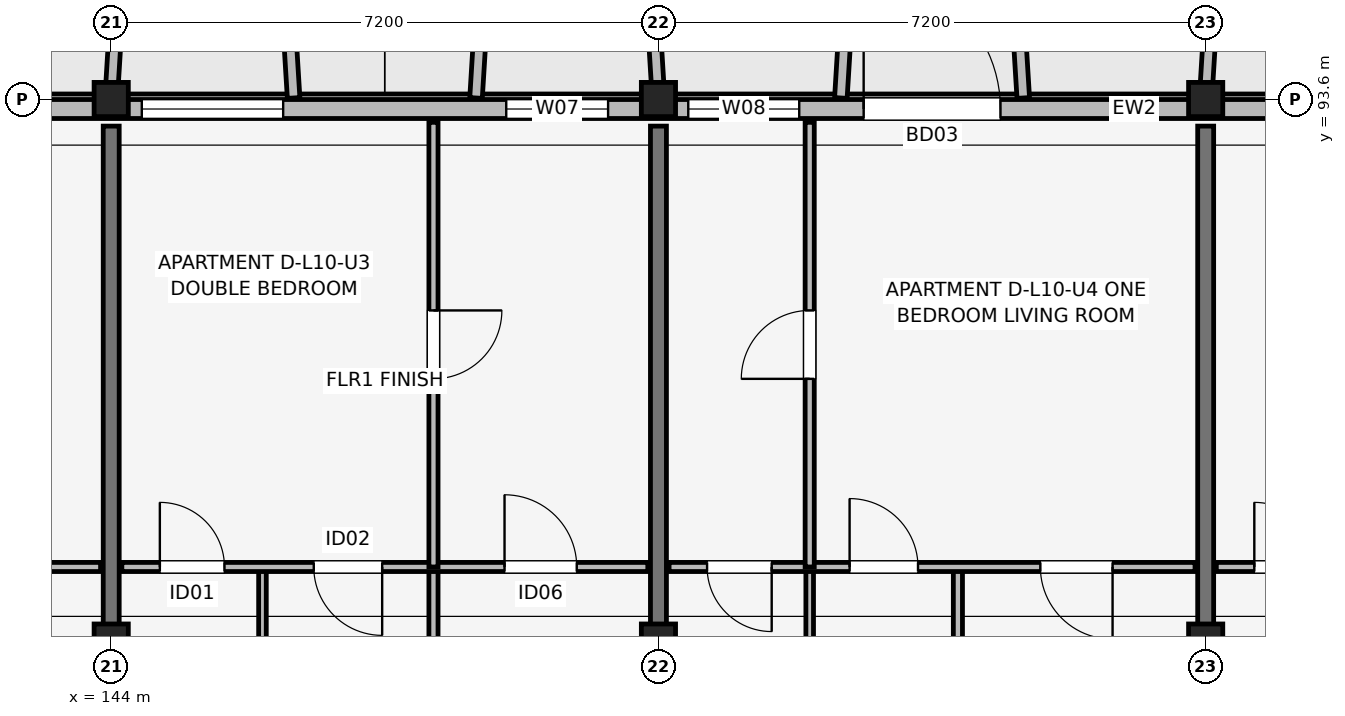
"""IFC4 building model, lengths in metres.
Left out: names, types, materials, properties, quantities, classifications, styles, units other than length and angle.
Written with IfcOpenShell. Run it as: python <this file> out.ifc"""

import sys

from ifc_helpers import new_model, si_unit, direction, frame, frame_2d, origin, origin_2d, place, context, subcontext, project, spatial, rectangle, extrude, element, fill, save


model = new_model("IFC4")
c1 = context("Model", 3, precision=1e-05, world=origin(), true_north=direction((0.0, 1.0)))
c2 = subcontext(c1, "Body", "Model", "MODEL_VIEW")
j1 = project(units=[si_unit("LENGTHUNIT", "METRE"), si_unit("PLANEANGLEUNIT", "RADIAN")], contexts=[c1])
p1 = place(None, origin())
s1 = spatial("IfcSite", under=j1, at=p1, CompositionType="ELEMENT")
p2 = place(p1, origin())
s2 = spatial("IfcBuilding", under=s1, at=p2, CompositionType="ELEMENT")
p3 = place(p2, frame((0.0, 0.0, 33.9)))
s3 = spatial("IfcBuildingStorey", under=s2, at=p3, CompositionType="ELEMENT", Elevation=33.9)
p4 = place(p3, frame((144.0, 86.4, 0.0), z_axis=(0.0, 0.0, 1.0), x_axis=(1.0, 0.0, 0.0)))
e1 = element("IfcColumn", 1, at=p4, inside=s3, PredefinedType="COLUMN", context=c2, shape_type="SweptSolid", body=[
    extrude(rectangle(XDim=0.45, YDim=0.6, at=origin_2d()), origin(), (0.0, 0.0, 1.0), 3.15),
])
p5 = place(p3, frame((144.0, 93.6, 0.0), z_axis=(0.0, 0.0, 1.0), x_axis=(1.0, 0.0, 0.0)))
e2 = element("IfcColumn", 2, at=p5, inside=s3, PredefinedType="COLUMN", context=c2, shape_type="SweptSolid", body=[
    extrude(rectangle(XDim=0.45, YDim=0.45, at=origin_2d()), origin(), (0.0, 0.0, 1.0), 3.15),
])
p6 = place(p3, frame((151.2, 86.4, 0.0), z_axis=(0.0, 0.0, 1.0), x_axis=(1.0, 0.0, 0.0)))
e3 = element("IfcColumn", 3, at=p6, inside=s3, PredefinedType="COLUMN", context=c2, shape_type="SweptSolid", body=[
    extrude(rectangle(XDim=0.45, YDim=0.6, at=origin_2d()), origin(), (0.0, 0.0, 1.0), 3.15),
])
p7 = place(p3, frame((151.2, 93.6, 0.0), z_axis=(0.0, 0.0, 1.0), x_axis=(1.0, 0.0, 0.0)))
e4 = element("IfcColumn", 4, at=p7, inside=s3, PredefinedType="COLUMN", context=c2, shape_type="SweptSolid", body=[
    extrude(rectangle(XDim=0.45, YDim=0.45, at=origin_2d()), origin(), (0.0, 0.0, 1.0), 3.15),
])
p8 = place(p3, frame((158.4, 86.4, 0.0), z_axis=(0.0, 0.0, 1.0), x_axis=(1.0, 0.0, 0.0)))
e5 = element("IfcColumn", 5, at=p8, inside=s3, PredefinedType="COLUMN", context=c2, shape_type="SweptSolid", body=[
    extrude(rectangle(XDim=0.45, YDim=0.6, at=origin_2d()), origin(), (0.0, 0.0, 1.0), 3.15),
])
p9 = place(p3, frame((158.4, 93.6, 0.0), z_axis=(0.0, 0.0, 1.0), x_axis=(1.0, 0.0, 0.0)))
e6 = element("IfcColumn", 6, at=p9, inside=s3, PredefinedType="COLUMN", context=c2, shape_type="SweptSolid", body=[
    extrude(rectangle(XDim=0.45, YDim=0.45, at=origin_2d()), origin(), (0.0, 0.0, 1.0), 3.15),
])
for number, where, z_axis, x_axis in (
    (7, (144.0, 83.85, 0.0), (0.0, 0.0, 1.0), (0.0, 1.0, 0.0)),
    (8, (151.2, 83.85, 0.0), (0.0, 0.0, 1.0), (0.0, 1.0, 0.0)),
    (9, (158.4, 83.85, 0.0), (0.0, 0.0, 1.0), (0.0, 1.0, 0.0)),
):
    element("IfcWall", number, at=place(p3, frame(where, z_axis=z_axis, x_axis=x_axis)), inside=s3, PredefinedType="SHEAR", context=c2, shape_type="SweptSolid", body=[
        extrude(rectangle(XDim=9.4, YDim=0.21, at=frame_2d((4.7, 0.0))), origin(), (0.0, 0.0, 1.0), 3.15),
    ])
p10 = place(p3, frame((162.8, 93.475, 0.0), z_axis=(0.0, 0.0, 1.0), x_axis=(-1.0, 0.0, 0.0)))
e10 = element("IfcWall", 10, at=p10, inside=s3, PredefinedType="SOLIDWALL", context=c2, shape_type="SweptSolid", body=[
    extrude(rectangle(XDim=30.4, YDim=0.25, at=frame_2d((15.2, 0.0))), origin(), (0.0, 0.0, 1.0), 2.45),
])
p11 = place(p10, frame((23.15, 0.0, 0.0), z_axis=(0.0, 0.0, 1.0), x_axis=(-1.0, 0.0, 0.0)))
e11 = element("IfcOpeningElement", 11, at=p11, cuts=e10, PredefinedType="OPENING", context=c2, shape_type="SweptSolid", body=[
    extrude(rectangle(XDim=1.5, YDim=2.15, at=frame_2d((0.75, 1.075))), frame((0.0, 0.135, 0.0), z_axis=(0.0, -1.0, 0.0), x_axis=(1.0, 0.0, 0.0)), (0.0, 0.0, 1.0), 0.27),
])
p12 = place(p10, frame((8.9, 0.0, 0.0), z_axis=(0.0, 0.0, 1.0), x_axis=(-1.0, 0.0, 0.0)))
e12 = element("IfcOpeningElement", 12, at=p12, cuts=e10, PredefinedType="OPENING", context=c2, shape_type="SweptSolid", body=[
    extrude(rectangle(XDim=1.8, YDim=2.15, at=frame_2d((0.9, 1.075))), frame((0.0, 0.135, 0.0), z_axis=(0.0, -1.0, 0.0), x_axis=(1.0, 0.0, 0.0)), (0.0, 0.0, 1.0), 0.27),
])
p13 = place(p10, frame((26.403, 0.0, 0.7)))
e13 = element("IfcOpeningElement", 13, at=p13, cuts=e10, PredefinedType="OPENING", context=c2, shape_type="SweptSolid", body=[
    extrude(rectangle(XDim=1.86, YDim=1.6, at=frame_2d((0.93, 0.8))), frame((0.0, 0.135, 0.0), z_axis=(0.0, -1.0, 0.0), x_axis=(1.0, 0.0, 0.0)), (0.0, 0.0, 1.0), 0.27),
])
p14 = place(p10, frame((16.538, 0.0, 0.7)))
e14 = element("IfcOpeningElement", 14, at=p14, cuts=e10, PredefinedType="OPENING", context=c2, shape_type="SweptSolid", body=[
    extrude(rectangle(XDim=1.86, YDim=1.6, at=frame_2d((0.93, 0.8))), frame((0.0, 0.135, 0.0), z_axis=(0.0, -1.0, 0.0), x_axis=(1.0, 0.0, 0.0)), (0.0, 0.0, 1.0), 0.27),
])
p15 = place(p10, frame((12.262, 0.0, 0.75)))
e15 = element("IfcOpeningElement", 15, at=p15, cuts=e10, PredefinedType="OPENING", context=c2, shape_type="SweptSolid", body=[
    extrude(rectangle(XDim=1.34, YDim=1.55, at=frame_2d((0.67, 0.775))), frame((0.0, 0.135, 0.0), z_axis=(0.0, -1.0, 0.0), x_axis=(1.0, 0.0, 0.0)), (0.0, 0.0, 1.0), 0.27),
])
p16 = place(p10, frame((9.748, 0.0, 0.75)))
e16 = element("IfcOpeningElement", 16, at=p16, cuts=e10, PredefinedType="OPENING", context=c2, shape_type="SweptSolid", body=[
    extrude(rectangle(XDim=1.46, YDim=1.55, at=frame_2d((0.73, 0.775))), frame((0.0, 0.135, 0.0), z_axis=(0.0, -1.0, 0.0), x_axis=(1.0, 0.0, 0.0)), (0.0, 0.0, 1.0), 0.27),
])
p17 = place(p10, frame((2.978, 0.0, 0.75)))
e17 = element("IfcOpeningElement", 17, at=p17, cuts=e10, PredefinedType="OPENING", context=c2, shape_type="SweptSolid", body=[
    extrude(rectangle(XDim=0.6, YDim=1.25, at=frame_2d((0.3, 0.625))), frame((0.0, 0.135, 0.0), z_axis=(0.0, -1.0, 0.0), x_axis=(1.0, 0.0, 0.0)), (0.0, 0.0, 1.0), 0.27),
])
p18 = place(p10, frame((0.725, 0.0, 0.75)))
e18 = element("IfcOpeningElement", 18, at=p18, cuts=e10, PredefinedType="OPENING", context=c2, shape_type="SweptSolid", body=[
    extrude(rectangle(XDim=0.72, YDim=1.35, at=frame_2d((0.36, 0.675))), frame((0.0, 0.135, 0.0), z_axis=(0.0, -1.0, 0.0), x_axis=(1.0, 0.0, 0.0)), (0.0, 0.0, 1.0), 0.27),
])
for number, where, z_axis, x_axis in (
    (19, (144.0, 93.62, 0.0), (0.0, 0.0, 1.0), (0.061, 0.998, 0.0)),
    (20, (146.4, 93.62, 0.0), (0.0, 0.0, 1.0), (-0.061, 0.998, 0.0)),
    (21, (148.8, 93.62, 0.0), (0.0, 0.0, 1.0), (0.061, 0.998, 0.0)),
    (22, (151.2, 93.62, 0.0), (0.0, 0.0, 1.0), (-0.061, 0.998, 0.0)),
):
    element("IfcWall", number, at=place(p3, frame(where, z_axis=z_axis, x_axis=x_axis)), inside=s3, PredefinedType="ELEMENTEDWALL", context=c2, shape_type="SweptSolid", body=[
        extrude(rectangle(XDim=1.964, YDim=0.165, at=frame_2d((0.982, 0.0))), origin(), (0.0, 0.0, 1.0), 2.58),
    ])
for number, where, z_axis, x_axis in (
    (23, (153.6, 93.62, 0.0), (0.0, 0.0, 1.0), (0.061, 0.998, 0.0)),
    (24, (156.0, 93.62, 0.0), (0.0, 0.0, 1.0), (-0.061, 0.998, 0.0)),
):
    element("IfcWall", number, at=place(p3, frame(where, z_axis=z_axis, x_axis=x_axis)), inside=s3, PredefinedType="ELEMENTEDWALL", context=c2, shape_type="SweptSolid", body=[
        extrude(rectangle(XDim=1.964, YDim=0.165, at=frame_2d((0.982, 0.0))), origin(), (0.0, 0.0, 1.0), 2.45),
    ])
p19 = place(p3, frame((158.4, 93.62, 0.0), z_axis=(0.0, 0.0, 1.0), x_axis=(0.061170732449, 0.998127317276, 0.0)))
e25 = element("IfcWall", 25, at=p19, inside=s3, PredefinedType="ELEMENTEDWALL", context=c2, shape_type="SweptSolid", body=[
    extrude(rectangle(XDim=1.964, YDim=0.165, at=frame_2d((0.982, 0.0))), origin(), (0.0, 0.0, 1.0), 2.95),
])
p20 = place(p3, frame((136.94, 87.45, 0.0), z_axis=(0.0, 0.0, 1.0), x_axis=(1.0, 0.0, 0.0)))
e26 = element("IfcWall", 26, at=p20, inside=s3, PredefinedType="PARTITIONING", context=c2, shape_type="SweptSolid", body=[
    extrude(rectangle(XDim=6.92, YDim=0.12, at=frame_2d((3.46, 0.0))), origin(), (0.0, 0.0, 1.0), 2.38),
])
p21 = place(p20, frame((0.5, 0.0, 0.0)))
e27 = element("IfcOpeningElement", 27, at=p21, cuts=e26, PredefinedType="OPENING", context=c2, shape_type="SweptSolid", body=[
    extrude(rectangle(XDim=0.85, YDim=2.08, at=frame_2d((0.425, 1.04))), frame((0.0, 0.07, 0.0), z_axis=(0.0, -1.0, 0.0), x_axis=(1.0, 0.0, 0.0)), (0.0, 0.0, 1.0), 0.14),
])
p22 = place(p20, frame((3.275, 0.0, 0.0), z_axis=(0.0, 0.0, 1.0), x_axis=(-1.0, 0.0, 0.0)))
e28 = element("IfcOpeningElement", 28, at=p22, cuts=e26, PredefinedType="OPENING", context=c2, shape_type="SweptSolid", body=[
    extrude(rectangle(XDim=0.9, YDim=2.08, at=frame_2d((0.45, 1.04))), frame((0.0, 0.07, 0.0), z_axis=(0.0, -1.0, 0.0), x_axis=(1.0, 0.0, 0.0)), (0.0, 0.0, 1.0), 0.14),
])
p23 = place(p20, frame((4.885, 0.0, 0.0)))
e29 = element("IfcOpeningElement", 29, at=p23, cuts=e26, PredefinedType="OPENING", context=c2, shape_type="SweptSolid", body=[
    extrude(rectangle(XDim=0.95, YDim=2.08, at=frame_2d((0.475, 1.04))), frame((0.0, 0.07, 0.0), z_axis=(0.0, -1.0, 0.0), x_axis=(1.0, 0.0, 0.0)), (0.0, 0.0, 1.0), 0.14),
])
p24 = place(p3, frame((145.99, 83.7, 0.0), z_axis=(0.0, 0.0, 1.0), x_axis=(0.0, 1.0, 0.0)))
e30 = element("IfcWall", 30, at=p24, inside=s3, PredefinedType="PARTITIONING", context=c2, shape_type="SweptSolid", body=[
    extrude(rectangle(XDim=3.75, YDim=0.1, at=frame_2d((1.875, 0.0))), origin(), (0.0, 0.0, 1.0), 2.38),
])
p25 = place(p3, frame((148.24, 83.7, 0.0), z_axis=(0.0, 0.0, 1.0), x_axis=(0.0, 1.0, 0.0)))
e31 = element("IfcWall", 31, at=p25, inside=s3, PredefinedType="PARTITIONING", context=c2, shape_type="SweptSolid", body=[
    extrude(rectangle(XDim=3.75, YDim=0.12, at=frame_2d((1.875, 0.0))), origin(), (0.0, 0.0, 1.0), 2.38),
])
p26 = place(p3, frame((144.14, 87.45, 0.0), z_axis=(0.0, 0.0, 1.0), x_axis=(1.0, 0.0, 0.0)))
e32 = element("IfcWall", 32, at=p26, inside=s3, PredefinedType="PARTITIONING", context=c2, shape_type="SweptSolid", body=[
    extrude(rectangle(XDim=6.92, YDim=0.12, at=frame_2d((3.46, 0.0))), origin(), (0.0, 0.0, 1.0), 2.38),
])
p27 = place(p26, frame((0.5, 0.0, 0.0)))
e33 = element("IfcOpeningElement", 33, at=p27, cuts=e32, PredefinedType="OPENING", context=c2, shape_type="SweptSolid", body=[
    extrude(rectangle(XDim=0.85, YDim=2.08, at=frame_2d((0.425, 1.04))), frame((0.0, 0.07, 0.0), z_axis=(0.0, -1.0, 0.0), x_axis=(1.0, 0.0, 0.0)), (0.0, 0.0, 1.0), 0.14),
])
p28 = place(p26, frame((3.425, 0.0, 0.0), z_axis=(0.0, 0.0, 1.0), x_axis=(-1.0, 0.0, 0.0)))
e34 = element("IfcOpeningElement", 34, at=p28, cuts=e32, PredefinedType="OPENING", context=c2, shape_type="SweptSolid", body=[
    extrude(rectangle(XDim=0.9, YDim=2.08, at=frame_2d((0.45, 1.04))), frame((0.0, 0.07, 0.0), z_axis=(0.0, -1.0, 0.0), x_axis=(1.0, 0.0, 0.0)), (0.0, 0.0, 1.0), 0.14),
])
p29 = place(p26, frame((5.035, 0.0, 0.0)))
e35 = element("IfcOpeningElement", 35, at=p29, cuts=e32, PredefinedType="OPENING", context=c2, shape_type="SweptSolid", body=[
    extrude(rectangle(XDim=0.95, YDim=2.08, at=frame_2d((0.475, 1.04))), frame((0.0, 0.07, 0.0), z_axis=(0.0, -1.0, 0.0), x_axis=(1.0, 0.0, 0.0)), (0.0, 0.0, 1.0), 0.14),
])
p30 = place(p3, frame((148.24, 87.45, 0.0), z_axis=(0.0, 0.0, 1.0), x_axis=(0.0, 1.0, 0.0)))
e36 = element("IfcWall", 36, at=p30, inside=s3, PredefinedType="PARTITIONING", context=c2, shape_type="SweptSolid", body=[
    extrude(rectangle(XDim=5.85, YDim=0.12, at=frame_2d((2.925, 0.0))), origin(), (0.0, 0.0, 1.0), 2.38),
])
p31 = place(p30, frame((3.375, 0.0, 0.0), z_axis=(0.0, 0.0, 1.0), x_axis=(-1.0, 0.0, 0.0)))
e37 = element("IfcOpeningElement", 37, at=p31, cuts=e36, PredefinedType="OPENING", context=c2, shape_type="SweptSolid", body=[
    extrude(rectangle(XDim=0.9, YDim=2.08, at=frame_2d((0.45, 1.04))), frame((0.0, 0.07, 0.0), z_axis=(0.0, -1.0, 0.0), x_axis=(1.0, 0.0, 0.0)), (0.0, 0.0, 1.0), 0.14),
])
p32 = place(p3, frame((153.19, 83.7, 0.0), z_axis=(0.0, 0.0, 1.0), x_axis=(0.0, 1.0, 0.0)))
e38 = element("IfcWall", 38, at=p32, inside=s3, PredefinedType="PARTITIONING", context=c2, shape_type="SweptSolid", body=[
    extrude(rectangle(XDim=3.75, YDim=0.1, at=frame_2d((1.875, 0.0))), origin(), (0.0, 0.0, 1.0), 2.38),
])
p33 = place(p3, frame((155.14, 83.7, 0.0), z_axis=(0.0, 0.0, 1.0), x_axis=(0.0, 1.0, 0.0)))
e39 = element("IfcWall", 39, at=p33, inside=s3, PredefinedType="PARTITIONING", context=c2, shape_type="SweptSolid", body=[
    extrude(rectangle(XDim=3.75, YDim=0.12, at=frame_2d((1.875, 0.0))), origin(), (0.0, 0.0, 1.0), 2.38),
])
p34 = place(p3, frame((151.34, 87.45, 0.0), z_axis=(0.0, 0.0, 1.0), x_axis=(1.0, 0.0, 0.0)))
e40 = element("IfcWall", 40, at=p34, inside=s3, PredefinedType="PARTITIONING", context=c2, shape_type="SweptSolid", body=[
    extrude(rectangle(XDim=6.92, YDim=0.12, at=frame_2d((3.46, 0.0))), origin(), (0.0, 0.0, 1.0), 2.38),
])
p35 = place(p34, frame((1.35, 0.0, 0.0), z_axis=(0.0, 0.0, 1.0), x_axis=(-1.0, 0.0, 0.0)))
e41 = element("IfcOpeningElement", 41, at=p35, cuts=e40, PredefinedType="OPENING", context=c2, shape_type="SweptSolid", body=[
    extrude(rectangle(XDim=0.85, YDim=2.08, at=frame_2d((0.425, 1.04))), frame((0.0, 0.07, 0.0), z_axis=(0.0, -1.0, 0.0), x_axis=(1.0, 0.0, 0.0)), (0.0, 0.0, 1.0), 0.14),
])
p36 = place(p34, frame((2.375, 0.0, 0.0)))
e42 = element("IfcOpeningElement", 42, at=p36, cuts=e40, PredefinedType="OPENING", context=c2, shape_type="SweptSolid", body=[
    extrude(rectangle(XDim=0.9, YDim=2.08, at=frame_2d((0.45, 1.04))), frame((0.0, 0.07, 0.0), z_axis=(0.0, -1.0, 0.0), x_axis=(1.0, 0.0, 0.0)), (0.0, 0.0, 1.0), 0.14),
])
p37 = place(p34, frame((5.835, 0.0, 0.0), z_axis=(0.0, 0.0, 1.0), x_axis=(-1.0, 0.0, 0.0)))
e43 = element("IfcOpeningElement", 43, at=p37, cuts=e40, PredefinedType="OPENING", context=c2, shape_type="SweptSolid", body=[
    extrude(rectangle(XDim=0.95, YDim=2.08, at=frame_2d((0.475, 1.04))), frame((0.0, 0.07, 0.0), z_axis=(0.0, -1.0, 0.0), x_axis=(1.0, 0.0, 0.0)), (0.0, 0.0, 1.0), 0.14),
])
p38 = place(p3, frame((153.19, 87.45, 0.0), z_axis=(0.0, 0.0, 1.0), x_axis=(0.0, 1.0, 0.0)))
e44 = element("IfcWall", 44, at=p38, inside=s3, PredefinedType="PARTITIONING", context=c2, shape_type="SweptSolid", body=[
    extrude(rectangle(XDim=5.85, YDim=0.12, at=frame_2d((2.925, 0.0))), origin(), (0.0, 0.0, 1.0), 2.38),
])
p39 = place(p38, frame((2.475, 0.0, 0.0)))
e45 = element("IfcOpeningElement", 45, at=p39, cuts=e44, PredefinedType="OPENING", context=c2, shape_type="SweptSolid", body=[
    extrude(rectangle(XDim=0.9, YDim=2.08, at=frame_2d((0.45, 1.04))), frame((0.0, 0.07, 0.0), z_axis=(0.0, -1.0, 0.0), x_axis=(1.0, 0.0, 0.0)), (0.0, 0.0, 1.0), 0.14),
])
p40 = place(p3, frame((158.54, 87.45, 0.0), z_axis=(0.0, 0.0, 1.0), x_axis=(1.0, 0.0, 0.0)))
e46 = element("IfcWall", 46, at=p40, inside=s3, PredefinedType="PARTITIONING", context=c2, shape_type="SweptSolid", body=[
    extrude(rectangle(XDim=6.92, YDim=0.12, at=frame_2d((3.46, 0.0))), origin(), (0.0, 0.0, 1.0), 2.38),
])
p41 = place(p40, frame((0.5, 0.0, 0.0)))
e47 = element("IfcOpeningElement", 47, at=p41, cuts=e46, PredefinedType="OPENING", context=c2, shape_type="SweptSolid", body=[
    extrude(rectangle(XDim=0.85, YDim=2.08, at=frame_2d((0.425, 1.04))), frame((0.0, 0.07, 0.0), z_axis=(0.0, -1.0, 0.0), x_axis=(1.0, 0.0, 0.0)), (0.0, 0.0, 1.0), 0.14),
])
p42 = place(p40, frame((3.155, 0.0, 0.0), z_axis=(0.0, 0.0, 1.0), x_axis=(-1.0, 0.0, 0.0)))
e48 = element("IfcOpeningElement", 48, at=p42, cuts=e46, PredefinedType="OPENING", context=c2, shape_type="SweptSolid", body=[
    extrude(rectangle(XDim=0.9, YDim=2.08, at=frame_2d((0.45, 1.04))), frame((0.0, 0.07, 0.0), z_axis=(0.0, -1.0, 0.0), x_axis=(1.0, 0.0, 0.0)), (0.0, 0.0, 1.0), 0.14),
])
p43 = place(p40, frame((3.91, 0.0, 0.0)))
e49 = element("IfcOpeningElement", 49, at=p43, cuts=e46, PredefinedType="OPENING", context=c2, shape_type="SweptSolid", body=[
    extrude(rectangle(XDim=0.95, YDim=2.08, at=frame_2d((0.475, 1.04))), frame((0.0, 0.07, 0.0), z_axis=(0.0, -1.0, 0.0), x_axis=(1.0, 0.0, 0.0)), (0.0, 0.0, 1.0), 0.14),
])
p44 = place(p12, origin())
e50 = element("IfcDoor", 50, at=p44, inside=s3, OperationType="SINGLE_SWING_RIGHT", PredefinedType="DOOR", context=c2, shape_type="SweptSolid", body=[
    extrude(rectangle(XDim=1.8, YDim=2.15, at=frame_2d((0.9, 1.075))), frame((0.0, 0.025, 0.0), z_axis=(0.0, -1.0, 0.0), x_axis=(1.0, 0.0, 0.0)), (0.0, 0.0, 1.0), 0.05),
])
fill(e12, e50)
p45 = place(p14, origin())
e51 = element("IfcWindow", 51, at=p45, inside=s3, PartitioningType="SINGLE_PANEL", PredefinedType="WINDOW", context=c2, shape_type="SweptSolid", body=[
    extrude(rectangle(XDim=1.86, YDim=1.6, at=frame_2d((0.93, 0.8))), frame((0.0, 0.03, 0.0), z_axis=(0.0, -1.0, 0.0), x_axis=(1.0, 0.0, 0.0)), (0.0, 0.0, 1.0), 0.06),
])
fill(e14, e51)
p46 = place(p15, origin())
e52 = element("IfcWindow", 52, at=p46, inside=s3, PartitioningType="SINGLE_PANEL", PredefinedType="WINDOW", context=c2, shape_type="SweptSolid", body=[
    extrude(rectangle(XDim=1.34, YDim=1.55, at=frame_2d((0.67, 0.775))), frame((0.0, 0.03, 0.0), z_axis=(0.0, -1.0, 0.0), x_axis=(1.0, 0.0, 0.0)), (0.0, 0.0, 1.0), 0.06),
])
fill(e15, e52)
p47 = place(p16, origin())
e53 = element("IfcWindow", 53, at=p47, inside=s3, PartitioningType="SINGLE_PANEL", PredefinedType="WINDOW", context=c2, shape_type="SweptSolid", body=[
    extrude(rectangle(XDim=1.46, YDim=1.55, at=frame_2d((0.73, 0.775))), frame((0.0, 0.03, 0.0), z_axis=(0.0, -1.0, 0.0), x_axis=(1.0, 0.0, 0.0)), (0.0, 0.0, 1.0), 0.06),
])
fill(e16, e53)
p48 = place(p27, origin())
e54 = element("IfcDoor", 54, at=p48, inside=s3, OperationType="SINGLE_SWING_LEFT", PredefinedType="DOOR", context=c2, shape_type="SweptSolid", body=[
    extrude(rectangle(XDim=0.85, YDim=2.08, at=frame_2d((0.425, 1.04))), frame((0.0, 0.025, 0.0), z_axis=(0.0, -1.0, 0.0), x_axis=(1.0, 0.0, 0.0)), (0.0, 0.0, 1.0), 0.05),
])
fill(e33, e54)
p49 = place(p28, origin())
e55 = element("IfcDoor", 55, at=p49, inside=s3, OperationType="SINGLE_SWING_RIGHT", PredefinedType="DOOR", context=c2, shape_type="SweptSolid", body=[
    extrude(rectangle(XDim=0.9, YDim=2.08, at=frame_2d((0.45, 1.04))), frame((0.0, 0.025, 0.0), z_axis=(0.0, -1.0, 0.0), x_axis=(1.0, 0.0, 0.0)), (0.0, 0.0, 1.0), 0.05),
])
fill(e34, e55)
p50 = place(p29, origin())
e56 = element("IfcDoor", 56, at=p50, inside=s3, OperationType="SINGLE_SWING_LEFT", PredefinedType="DOOR", context=c2, shape_type="SweptSolid", body=[
    extrude(rectangle(XDim=0.95, YDim=2.08, at=frame_2d((0.475, 1.04))), frame((0.0, 0.025, 0.0), z_axis=(0.0, -1.0, 0.0), x_axis=(1.0, 0.0, 0.0)), (0.0, 0.0, 1.0), 0.05),
])
fill(e35, e56)
p51 = place(p31, origin())
e57 = element("IfcDoor", 57, at=p51, inside=s3, OperationType="SINGLE_SWING_RIGHT", PredefinedType="DOOR", context=c2, shape_type="SweptSolid", body=[
    extrude(rectangle(XDim=0.9, YDim=2.08, at=frame_2d((0.45, 1.04))), frame((0.0, 0.025, 0.0), z_axis=(0.0, -1.0, 0.0), x_axis=(1.0, 0.0, 0.0)), (0.0, 0.0, 1.0), 0.05),
])
fill(e37, e57)
p52 = place(p35, origin())
e58 = element("IfcDoor", 58, at=p52, inside=s3, OperationType="SINGLE_SWING_RIGHT", PredefinedType="DOOR", context=c2, shape_type="SweptSolid", body=[
    extrude(rectangle(XDim=0.85, YDim=2.08, at=frame_2d((0.425, 1.04))), frame((0.0, 0.025, 0.0), z_axis=(0.0, -1.0, 0.0), x_axis=(1.0, 0.0, 0.0)), (0.0, 0.0, 1.0), 0.05),
])
fill(e41, e58)
p53 = place(p36, origin())
e59 = element("IfcDoor", 59, at=p53, inside=s3, OperationType="SINGLE_SWING_LEFT", PredefinedType="DOOR", context=c2, shape_type="SweptSolid", body=[
    extrude(rectangle(XDim=0.9, YDim=2.08, at=frame_2d((0.45, 1.04))), frame((0.0, 0.025, 0.0), z_axis=(0.0, -1.0, 0.0), x_axis=(1.0, 0.0, 0.0)), (0.0, 0.0, 1.0), 0.05),
])
fill(e42, e59)
p54 = place(p37, origin())
e60 = element("IfcDoor", 60, at=p54, inside=s3, OperationType="SINGLE_SWING_RIGHT", PredefinedType="DOOR", context=c2, shape_type="SweptSolid", body=[
    extrude(rectangle(XDim=0.95, YDim=2.08, at=frame_2d((0.475, 1.04))), frame((0.0, 0.025, 0.0), z_axis=(0.0, -1.0, 0.0), x_axis=(1.0, 0.0, 0.0)), (0.0, 0.0, 1.0), 0.05),
])
fill(e43, e60)
p55 = place(p39, origin())
e61 = element("IfcDoor", 61, at=p55, inside=s3, OperationType="SINGLE_SWING_LEFT", PredefinedType="DOOR", context=c2, shape_type="SweptSolid", body=[
    extrude(rectangle(XDim=0.9, YDim=2.08, at=frame_2d((0.45, 1.04))), frame((0.0, 0.025, 0.0), z_axis=(0.0, -1.0, 0.0), x_axis=(1.0, 0.0, 0.0)), (0.0, 0.0, 1.0), 0.05),
])
fill(e45, e61)
p56 = place(p41, origin())
e62 = element("IfcDoor", 62, at=p56, inside=s3, OperationType="SINGLE_SWING_LEFT", PredefinedType="DOOR", context=c2, shape_type="SweptSolid", body=[
    extrude(rectangle(XDim=0.85, YDim=2.08, at=frame_2d((0.425, 1.04))), frame((0.0, 0.025, 0.0), z_axis=(0.0, -1.0, 0.0), x_axis=(1.0, 0.0, 0.0)), (0.0, 0.0, 1.0), 0.05),
])
fill(e47, e62)
save(model, sys.argv[1])
